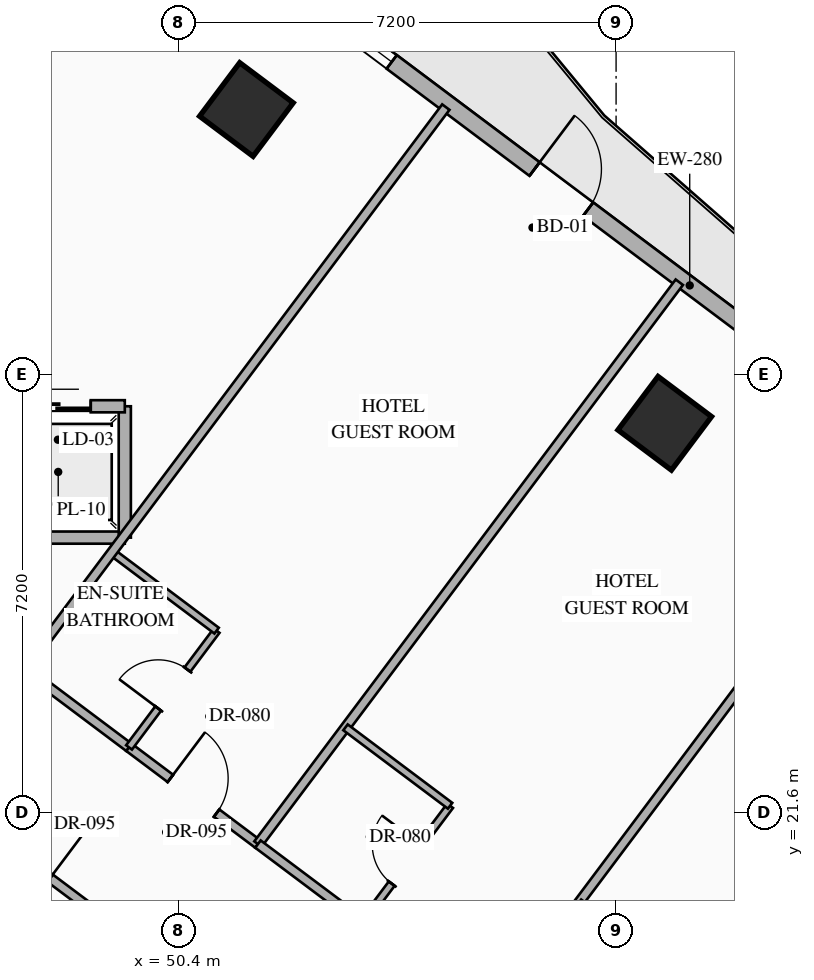
"""IFC4 building model, lengths in metres.
Left out: names, types, materials, properties, quantities, classifications, styles, units other than length and angle.
Written with IfcOpenShell. Run it as: python <this file> out.ifc"""

import sys

from ifc_helpers import new_model, si_unit, direction, frame, frame_2d, origin, origin_2d, place, context, subcontext, project, spatial, rectangle, hollow_rectangle, extrude, element, fill, save


model = new_model("IFC4")
c1 = context("Model", 3, precision=1e-05, world=origin(), true_north=direction((0.0, 1.0)))
c2 = subcontext(c1, "Body", "Model", "MODEL_VIEW")
j1 = project(units=[si_unit("LENGTHUNIT", "METRE"), si_unit("PLANEANGLEUNIT", "RADIAN")], contexts=[c1])
p1 = place(None, origin())
s1 = spatial("IfcSite", under=j1, at=p1, CompositionType="ELEMENT")
p2 = place(p1, origin())
s2 = spatial("IfcBuilding", under=s1, at=p2, CompositionType="ELEMENT")
p3 = place(p2, frame((0.0, 0.0, 36.6)))
s3 = spatial("IfcBuildingStorey", under=s2, at=p3, CompositionType="ELEMENT", Elevation=36.6)
for number, where, z_axis, x_axis in (
    (1, (51.52, 33.16, 0.0), (0.0, 0.0, 1.0), (0.8, -0.6, 0.0)),
    (2, (58.4, 28.0, 0.0), (0.0, 0.0, 1.0), (0.8, -0.6, 0.0)),
):
    element("IfcColumn", number, at=place(p3, frame(where, z_axis=z_axis, x_axis=x_axis)), inside=s3, PredefinedType="COLUMN", context=c2, shape_type="SweptSolid", body=[
        extrude(hollow_rectangle(XDim=1.1, YDim=1.1, WallThickness=0.04, at=origin_2d()), origin(), (0.0, 0.0, 1.0), 3.35),
    ])
p4 = place(p3, frame((44.86, 40.73, 0.0), z_axis=(0.0, 0.0, 1.0), x_axis=(0.800006902154, -0.599990797017, 0.0)))
e3 = element("IfcWall", 3, at=p4, inside=s3, PredefinedType="STANDARD", context=c2, shape_type="SweptSolid", body=[
    extrude(rectangle(XDim=29.712, YDim=0.28, at=frame_2d((14.856, 0.0))), origin(), (0.0, 0.0, 1.0), 3.13),
])
p5 = place(p4, frame((14.249, 0.0, 0.0)))
e4 = element("IfcOpeningElement", 4, at=p5, cuts=e3, PredefinedType="OPENING", context=c2, shape_type="SweptSolid", body=[
    extrude(rectangle(XDim=1.1, YDim=2.2, at=frame_2d((0.55, 1.1))), frame((0.0, 0.15, 0.0), z_axis=(0.0, -1.0, 0.0), x_axis=(1.0, 0.0, 0.0)), (0.0, 0.0, 1.0), 0.3),
])
p6 = place(p4, frame((1.612, 0.0, 0.85)))
e5 = element("IfcOpeningElement", 5, at=p6, cuts=e3, PredefinedType="OPENING", context=c2, shape_type="SweptSolid", body=[
    extrude(rectangle(XDim=1.4, YDim=1.8, at=frame_2d((0.7, 0.9))), frame((0.0, 0.15, 0.0), z_axis=(0.0, -1.0, 0.0), x_axis=(1.0, 0.0, 0.0)), (0.0, 0.0, 1.0), 0.3),
])
p7 = place(p4, frame((5.667, 0.0, 0.85)))
e6 = element("IfcOpeningElement", 6, at=p7, cuts=e3, PredefinedType="OPENING", context=c2, shape_type="SweptSolid", body=[
    extrude(rectangle(XDim=1.4, YDim=1.8, at=frame_2d((0.7, 0.9))), frame((0.0, 0.15, 0.0), z_axis=(0.0, -1.0, 0.0), x_axis=(1.0, 0.0, 0.0)), (0.0, 0.0, 1.0), 0.3),
])
p8 = place(p4, frame((9.912, 0.0, 0.85)))
e7 = element("IfcOpeningElement", 7, at=p8, cuts=e3, PredefinedType="OPENING", context=c2, shape_type="SweptSolid", body=[
    extrude(rectangle(XDim=1.4, YDim=1.8, at=frame_2d((0.7, 0.9))), frame((0.0, 0.15, 0.0), z_axis=(0.0, -1.0, 0.0), x_axis=(1.0, 0.0, 0.0)), (0.0, 0.0, 1.0), 0.3),
])
p9 = place(p4, frame((19.528, 0.0, 0.85)))
e8 = element("IfcOpeningElement", 8, at=p9, cuts=e3, PredefinedType="OPENING", context=c2, shape_type="SweptSolid", body=[
    extrude(rectangle(XDim=1.4, YDim=1.8, at=frame_2d((0.7, 0.9))), frame((0.0, 0.15, 0.0), z_axis=(0.0, -1.0, 0.0), x_axis=(1.0, 0.0, 0.0)), (0.0, 0.0, 1.0), 0.3),
])
p10 = place(p4, frame((23.451, 0.0, 0.85)))
e9 = element("IfcOpeningElement", 9, at=p10, cuts=e3, PredefinedType="OPENING", context=c2, shape_type="SweptSolid", body=[
    extrude(rectangle(XDim=1.4, YDim=1.8, at=frame_2d((0.7, 0.9))), frame((0.0, 0.15, 0.0), z_axis=(0.0, -1.0, 0.0), x_axis=(1.0, 0.0, 0.0)), (0.0, 0.0, 1.0), 0.3),
])
p11 = place(p4, frame((27.852, 0.0, 0.85)))
e10 = element("IfcOpeningElement", 10, at=p11, cuts=e3, PredefinedType="OPENING", context=c2, shape_type="SweptSolid", body=[
    extrude(rectangle(XDim=1.4, YDim=1.8, at=frame_2d((0.7, 0.9))), frame((0.0, 0.15, 0.0), z_axis=(0.0, -1.0, 0.0), x_axis=(1.0, 0.0, 0.0)), (0.0, 0.0, 1.0), 0.3),
])
p12 = place(p3, frame((53.318, 2.487, 0.0), z_axis=(0.0, 0.0, 1.0), x_axis=(-0.800004174678, 0.599994433723, 0.0)))
e11 = element("IfcWall", 11, at=p12, inside=s3, PredefinedType="STANDARD", context=c2, shape_type="SweptSolid", body=[
    extrude(rectangle(XDim=35.089, YDim=0.28, at=frame_2d((17.544, 0.0))), origin(), (0.0, 0.0, 1.0), 3.13),
])
p13 = place(p12, frame((1.931, 0.0, 0.85)))
e12 = element("IfcOpeningElement", 12, at=p13, cuts=e11, PredefinedType="OPENING", context=c2, shape_type="SweptSolid", body=[
    extrude(rectangle(XDim=1.4, YDim=1.8, at=frame_2d((0.7, 0.9))), frame((0.0, 0.15, 0.0), z_axis=(0.0, -1.0, 0.0), x_axis=(1.0, 0.0, 0.0)), (0.0, 0.0, 1.0), 0.3),
])
p14 = place(p12, frame((6.819, 0.0, 0.85)))
e13 = element("IfcOpeningElement", 13, at=p14, cuts=e11, PredefinedType="OPENING", context=c2, shape_type="SweptSolid", body=[
    extrude(rectangle(XDim=1.4, YDim=1.8, at=frame_2d((0.7, 0.9))), frame((0.0, 0.15, 0.0), z_axis=(0.0, -1.0, 0.0), x_axis=(1.0, 0.0, 0.0)), (0.0, 0.0, 1.0), 0.3),
])
p15 = place(p12, frame((11.832, 0.0, 0.85)))
e14 = element("IfcOpeningElement", 14, at=p15, cuts=e11, PredefinedType="OPENING", context=c2, shape_type="SweptSolid", body=[
    extrude(rectangle(XDim=1.4, YDim=1.8, at=frame_2d((0.7, 0.9))), frame((0.0, 0.15, 0.0), z_axis=(0.0, -1.0, 0.0), x_axis=(1.0, 0.0, 0.0)), (0.0, 0.0, 1.0), 0.3),
])
p16 = place(p12, frame((17.647, 0.0, 0.85)))
e15 = element("IfcOpeningElement", 15, at=p16, cuts=e11, PredefinedType="OPENING", context=c2, shape_type="SweptSolid", body=[
    extrude(rectangle(XDim=1.4, YDim=1.8, at=frame_2d((0.7, 0.9))), frame((0.0, 0.15, 0.0), z_axis=(0.0, -1.0, 0.0), x_axis=(1.0, 0.0, 0.0)), (0.0, 0.0, 1.0), 0.3),
])
p17 = place(p12, frame((21.857, 0.0, 0.85)))
e16 = element("IfcOpeningElement", 16, at=p17, cuts=e11, PredefinedType="OPENING", context=c2, shape_type="SweptSolid", body=[
    extrude(rectangle(XDim=1.4, YDim=1.8, at=frame_2d((0.7, 0.9))), frame((0.0, 0.15, 0.0), z_axis=(0.0, -1.0, 0.0), x_axis=(1.0, 0.0, 0.0)), (0.0, 0.0, 1.0), 0.3),
])
p18 = place(p12, frame((26.87, 0.0, 0.85)))
e17 = element("IfcOpeningElement", 17, at=p18, cuts=e11, PredefinedType="OPENING", context=c2, shape_type="SweptSolid", body=[
    extrude(rectangle(XDim=1.4, YDim=1.8, at=frame_2d((0.7, 0.9))), frame((0.0, 0.15, 0.0), z_axis=(0.0, -1.0, 0.0), x_axis=(1.0, 0.0, 0.0)), (0.0, 0.0, 1.0), 0.3),
])
p19 = place(p12, frame((31.757, 0.0, 0.85)))
e18 = element("IfcOpeningElement", 18, at=p19, cuts=e11, PredefinedType="OPENING", context=c2, shape_type="SweptSolid", body=[
    extrude(rectangle(XDim=1.4, YDim=1.8, at=frame_2d((0.7, 0.9))), frame((0.0, 0.15, 0.0), z_axis=(0.0, -1.0, 0.0), x_axis=(1.0, 0.0, 0.0)), (0.0, 0.0, 1.0), 0.3),
])
p20 = place(p3, frame((45.12, 26.12, 0.0), z_axis=(0.0, 0.0, 1.0), x_axis=(1.0, 0.0, 0.0)))
e19 = element("IfcWall", 19, at=p20, inside=s3, PredefinedType="STANDARD", context=c2, shape_type="SweptSolid", body=[
    extrude(rectangle(XDim=4.4, YDim=0.2, at=frame_2d((2.2, 0.0))), origin(), (0.0, 0.0, 1.0), 3.13),
])
p21 = place(p3, frame((49.52, 26.12, 0.0), z_axis=(0.0, 0.0, 1.0), x_axis=(0.0, 1.0, 0.0)))
e20 = element("IfcWall", 20, at=p21, inside=s3, PredefinedType="STANDARD", context=c2, shape_type="SweptSolid", body=[
    extrude(rectangle(XDim=2.16, YDim=0.2, at=frame_2d((1.08, 0.0))), origin(), (0.0, 0.0, 1.0), 3.13),
])
p22 = place(p3, frame((45.12, 28.28, 0.0), z_axis=(0.0, 0.0, 1.0), x_axis=(1.0, 0.0, 0.0)))
e21 = element("IfcWall", 21, at=p22, inside=s3, PredefinedType="STANDARD", context=c2, shape_type="SweptSolid", body=[
    extrude(rectangle(XDim=4.4, YDim=0.2, at=frame_2d((2.2, 0.0))), origin(), (0.0, 0.0, 1.0), 3.13),
])
p23 = place(p22, frame((0.56, 0.0, 0.0)))
e22 = element("IfcOpeningElement", 22, at=p23, cuts=e21, PredefinedType="OPENING", context=c2, shape_type="SweptSolid", body=[
    extrude(rectangle(XDim=1.08, YDim=2.15, at=frame_2d((0.54, 1.075))), frame((0.0, 0.11, 0.0), z_axis=(0.0, -1.0, 0.0), x_axis=(1.0, 0.0, 0.0)), (0.0, 0.0, 1.0), 0.22),
])
p24 = place(p22, frame((2.76, 0.0, 0.0)))
e23 = element("IfcOpeningElement", 23, at=p24, cuts=e21, PredefinedType="OPENING", context=c2, shape_type="SweptSolid", body=[
    extrude(rectangle(XDim=1.08, YDim=2.15, at=frame_2d((0.54, 1.075))), frame((0.0, 0.11, 0.0), z_axis=(0.0, -1.0, 0.0), x_axis=(1.0, 0.0, 0.0)), (0.0, 0.0, 1.0), 0.22),
])
p25 = place(p3, frame((47.87, 23.96, 0.0), z_axis=(0.0, 0.0, 1.0), x_axis=(0.79998637334, -0.60001816845, 0.0)))
e24 = element("IfcWall", 24, at=p25, inside=s3, PredefinedType="PARTITIONING", context=c2, shape_type="SweptSolid", body=[
    extrude(rectangle(XDim=2.15, YDim=0.15, at=frame_2d((1.075, 0.0))), origin(), (0.0, 0.0, 1.0), 2.775),
])
p26 = place(p3, frame((49.59, 22.67, 0.0), z_axis=(0.0, 0.0, 1.0), x_axis=(0.800011056104, -0.599985258246, 0.0)))
e25 = element("IfcWall", 25, at=p26, inside=s3, PredefinedType="PARTITIONING", context=c2, shape_type="SweptSolid", body=[
    extrude(rectangle(XDim=2.65, YDim=0.15, at=frame_2d((1.325, 0.0))), origin(), (0.0, 0.0, 1.0), 2.775),
])
p27 = place(p26, frame((0.85, 0.0, 0.0)))
e26 = element("IfcOpeningElement", 26, at=p27, cuts=e25, PredefinedType="OPENING", context=c2, shape_type="SweptSolid", body=[
    extrude(rectangle(XDim=0.95, YDim=2.15, at=frame_2d((0.475, 1.075))), frame((0.0, 0.085, 0.0), z_axis=(0.0, -1.0, 0.0), x_axis=(1.0, 0.0, 0.0)), (0.0, 0.0, 1.0), 0.17),
])
p28 = place(p3, frame((49.59, 22.67, 0.0), z_axis=(0.0, 0.0, 1.0), x_axis=(0.599951172744, 0.800036618114, 0.0)))
e27 = element("IfcWall", 27, at=p28, inside=s3, PredefinedType="PARTITIONING", context=c2, shape_type="SweptSolid", body=[
    extrude(rectangle(XDim=2.4, YDim=0.12, at=frame_2d((1.2, 0.0))), origin(), (0.0, 0.0, 1.0), 3.13),
])
p29 = place(p28, frame((0.8, 0.0, 0.0)))
e28 = element("IfcOpeningElement", 28, at=p29, cuts=e27, PredefinedType="OPENING", context=c2, shape_type="SweptSolid", body=[
    extrude(rectangle(XDim=0.8, YDim=2.06, at=frame_2d((0.4, 1.03))), frame((0.0, 0.07, 0.0), z_axis=(0.0, -1.0, 0.0), x_axis=(1.0, 0.0, 0.0)), (0.0, 0.0, 1.0), 0.14),
])
p30 = place(p3, frame((49.31, 25.88, 0.0), z_axis=(0.0, 0.0, 1.0), x_axis=(0.800040880289, -0.59994548908, 0.0)))
e29 = element("IfcWall", 29, at=p30, inside=s3, PredefinedType="PARTITIONING", context=c2, shape_type="SweptSolid", body=[
    extrude(rectangle(XDim=2.15, YDim=0.12, at=frame_2d((1.075, 0.0))), origin(), (0.0, 0.0, 1.0), 3.13),
])
for number, where, z_axis, x_axis in (
    (30, (47.87, 23.96, 0.0), (0.0, 0.0, 1.0), (0.6, 0.8, 0.0)),
    (31, (51.71, 21.08, 0.0), (0.0, 0.0, 1.0), (0.6, 0.8, 0.0)),
):
    element("IfcWall", number, at=place(p3, frame(where, z_axis=z_axis, x_axis=x_axis)), inside=s3, PredefinedType="PARTITIONING", context=c2, shape_type="SweptSolid", body=[
        extrude(rectangle(XDim=11.55, YDim=0.15, at=frame_2d((5.775, 0.0))), origin(), (0.0, 0.0, 1.0), 3.13),
    ])
p31 = place(p3, frame((51.71, 21.08, 0.0), z_axis=(0.0, 0.0, 1.0), x_axis=(0.79998637334, -0.60001816845, 0.0)))
e32 = element("IfcWall", 32, at=p31, inside=s3, PredefinedType="PARTITIONING", context=c2, shape_type="SweptSolid", body=[
    extrude(rectangle(XDim=2.15, YDim=0.15, at=frame_2d((1.075, 0.0))), origin(), (0.0, 0.0, 1.0), 2.775),
])
p32 = place(p3, frame((53.43, 19.79, 0.0), z_axis=(0.0, 0.0, 1.0), x_axis=(0.600065100855, 0.79995117022, 0.0)))
e33 = element("IfcWall", 33, at=p32, inside=s3, PredefinedType="PARTITIONING", context=c2, shape_type="SweptSolid", body=[
    extrude(rectangle(XDim=2.4, YDim=0.12, at=frame_2d((1.2, 0.0))), origin(), (0.0, 0.0, 1.0), 3.13),
])
p33 = place(p32, frame((0.8, 0.0, 0.0)))
e34 = element("IfcOpeningElement", 34, at=p33, cuts=e33, PredefinedType="OPENING", context=c2, shape_type="SweptSolid", body=[
    extrude(rectangle(XDim=0.8, YDim=2.06, at=frame_2d((0.4, 1.03))), frame((0.0, 0.07, 0.0), z_axis=(0.0, -1.0, 0.0), x_axis=(1.0, 0.0, 0.0)), (0.0, 0.0, 1.0), 0.14),
])
p34 = place(p3, frame((53.15, 23.0, 0.0), z_axis=(0.0, 0.0, 1.0), x_axis=(0.800027249606, -0.599963665473, 0.0)))
e35 = element("IfcWall", 35, at=p34, inside=s3, PredefinedType="PARTITIONING", context=c2, shape_type="SweptSolid", body=[
    extrude(rectangle(XDim=2.15, YDim=0.12, at=frame_2d((1.075, 0.0))), origin(), (0.0, 0.0, 1.0), 3.13),
])
p35 = place(p3, frame((55.55, 18.2, 0.0), z_axis=(0.0, 0.0, 1.0), x_axis=(0.599996617946, 0.80000253653, 0.0)))
e36 = element("IfcWall", 36, at=p35, inside=s3, PredefinedType="PARTITIONING", context=c2, shape_type="SweptSolid", body=[
    extrude(rectangle(XDim=11.55, YDim=0.15, at=frame_2d((5.775, 0.0))), origin(), (0.0, 0.0, 1.0), 3.13),
])
p36 = place(p3, frame((56.99, 20.12, 0.0), z_axis=(0.0, 0.0, 1.0), x_axis=(0.79998637334, -0.60001816845, 0.0)))
e37 = element("IfcWall", 37, at=p36, inside=s3, PredefinedType="PARTITIONING", context=c2, shape_type="SweptSolid", body=[
    extrude(rectangle(XDim=2.15, YDim=0.12, at=frame_2d((1.075, 0.0))), origin(), (0.0, 0.0, 1.0), 3.13),
])
p37 = place(p3, frame((59.55, 15.2, 0.0), z_axis=(0.0, 0.0, 1.0), x_axis=(0.599996617946, 0.80000253653, 0.0)))
e38 = element("IfcWall", 38, at=p37, inside=s3, PredefinedType="PARTITIONING", context=c2, shape_type="SweptSolid", body=[
    extrude(rectangle(XDim=11.55, YDim=0.15, at=frame_2d((5.775, 0.0))), origin(), (0.0, 0.0, 1.0), 3.13),
])
p38 = place(p3, frame((46.37, 21.96, 0.0), z_axis=(0.0, 0.0, 1.0), x_axis=(0.799977170108, -0.600030438649, 0.0)))
e39 = element("IfcWall", 39, at=p38, inside=s3, PredefinedType="PARTITIONING", context=c2, shape_type="SweptSolid", body=[
    extrude(rectangle(XDim=3.85, YDim=0.15, at=frame_2d((1.925, 0.0))), origin(), (0.0, 0.0, 1.0), 2.425),
])
p39 = place(p38, frame((1.45, 0.0, 0.0)))
e40 = element("IfcOpeningElement", 40, at=p39, cuts=e39, PredefinedType="OPENING", context=c2, shape_type="SweptSolid", body=[
    extrude(rectangle(XDim=0.95, YDim=2.15, at=frame_2d((0.475, 1.075))), frame((0.0, 0.085, 0.0), z_axis=(0.0, -1.0, 0.0), x_axis=(1.0, 0.0, 0.0)), (0.0, 0.0, 1.0), 0.17),
])
p40 = place(p5, origin())
e41 = element("IfcDoor", 41, at=p40, inside=s3, OperationType="SINGLE_SWING_LEFT", PredefinedType="DOOR", context=c2, shape_type="SweptSolid", body=[
    extrude(rectangle(XDim=1.1, YDim=2.2, at=frame_2d((0.55, 1.1))), frame((0.0, 0.025, 0.0), z_axis=(0.0, -1.0, 0.0), x_axis=(1.0, 0.0, 0.0)), (0.0, 0.0, 1.0), 0.05),
])
fill(e4, e41)
p41 = place(p8, origin())
e42 = element("IfcWindow", 42, at=p41, inside=s3, PartitioningType="SINGLE_PANEL", PredefinedType="WINDOW", context=c2, shape_type="SweptSolid", body=[
    extrude(rectangle(XDim=1.4, YDim=1.8, at=frame_2d((0.7, 0.9))), frame((0.0, 0.03, 0.0), z_axis=(0.0, -1.0, 0.0), x_axis=(1.0, 0.0, 0.0)), (0.0, 0.0, 1.0), 0.06),
])
fill(e7, e42)
p42 = place(p24, origin())
e43 = element("IfcDoor", 43, at=p42, inside=s3, OperationType="SLIDING_TO_LEFT", PredefinedType="USERDEFINED", context=c2, shape_type="SweptSolid", body=[
    extrude(rectangle(XDim=1.08, YDim=2.15, at=frame_2d((0.54, 1.075))), frame((0.0, 0.025, 0.0), z_axis=(0.0, -1.0, 0.0), x_axis=(1.0, 0.0, 0.0)), (0.0, 0.0, 1.0), 0.05),
])
fill(e23, e43)
p43 = place(p27, origin())
e44 = element("IfcDoor", 44, at=p43, inside=s3, OperationType="SINGLE_SWING_LEFT", PredefinedType="DOOR", context=c2, shape_type="SweptSolid", body=[
    extrude(rectangle(XDim=0.95, YDim=2.15, at=frame_2d((0.475, 1.075))), frame((0.0, 0.025, 0.0), z_axis=(0.0, -1.0, 0.0), x_axis=(1.0, 0.0, 0.0)), (0.0, 0.0, 1.0), 0.05),
])
fill(e26, e44)
p44 = place(p29, origin())
e45 = element("IfcDoor", 45, at=p44, inside=s3, OperationType="SINGLE_SWING_LEFT", PredefinedType="DOOR", context=c2, shape_type="SweptSolid", body=[
    extrude(rectangle(XDim=0.8, YDim=2.06, at=frame_2d((0.4, 1.03))), frame((0.0, 0.025, 0.0), z_axis=(0.0, -1.0, 0.0), x_axis=(1.0, 0.0, 0.0)), (0.0, 0.0, 1.0), 0.05),
])
fill(e28, e45)
p45 = place(p33, origin())
e46 = element("IfcDoor", 46, at=p45, inside=s3, OperationType="SINGLE_SWING_RIGHT", PredefinedType="DOOR", context=c2, shape_type="SweptSolid", body=[
    extrude(rectangle(XDim=0.8, YDim=2.06, at=frame_2d((0.4, 1.03))), frame((0.0, 0.025, 0.0), z_axis=(0.0, -1.0, 0.0), x_axis=(1.0, 0.0, 0.0)), (0.0, 0.0, 1.0), 0.05),
])
fill(e34, e46)
save(model, sys.argv[1])
